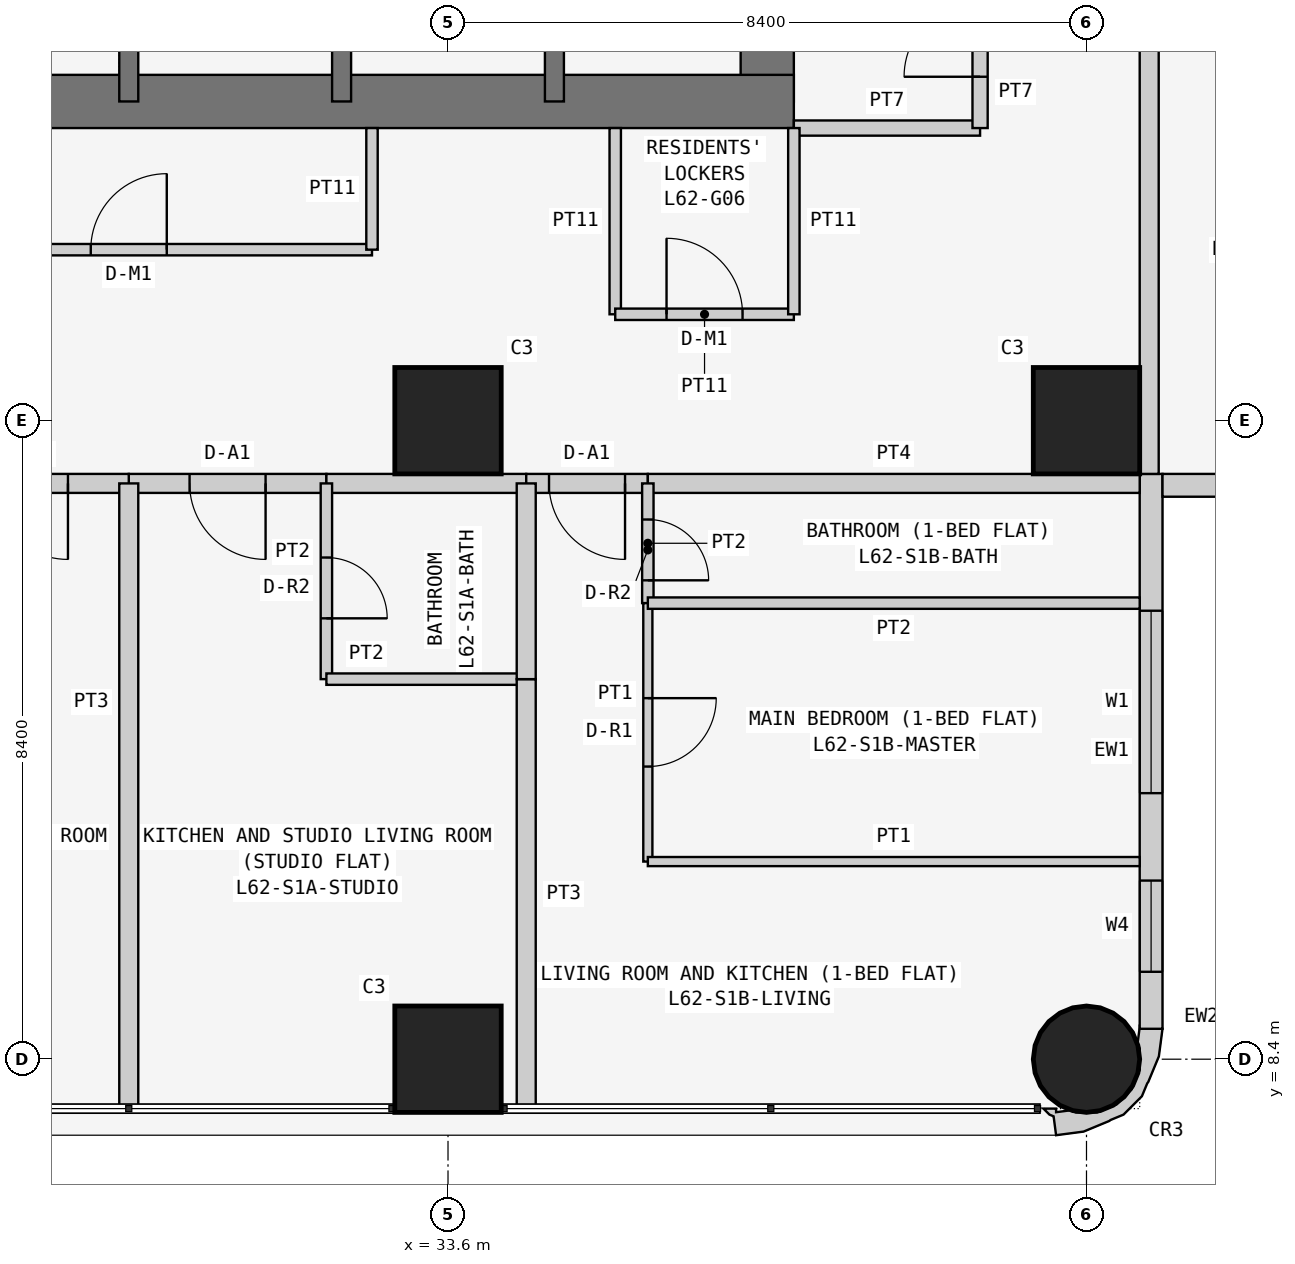
"""IFC4 building model, lengths in metres.
Left out: names, types, materials, properties, quantities, classifications, styles, units other than length and angle.
Written with IfcOpenShell. Run it as: python <this file> out.ifc"""

import sys

from ifc_helpers import new_model, si_unit, direction, frame, frame_2d, origin, origin_2d, place, context, subcontext, project, spatial, polyline, rectangle, circle, outline, extrude, element, fill, save


model = new_model("IFC4")
c1 = context("Model", 3, precision=1e-05, world=origin(), true_north=direction((0.0, 1.0)))
c2 = subcontext(c1, "Body", "Model", "MODEL_VIEW")
j1 = project(units=[si_unit("LENGTHUNIT", "METRE"), si_unit("PLANEANGLEUNIT", "RADIAN")], contexts=[c1])
p1 = place(None, origin())
s1 = spatial("IfcSite", under=j1, at=p1, CompositionType="ELEMENT")
p2 = place(p1, origin())
s2 = spatial("IfcBuilding", under=s1, at=p2, CompositionType="ELEMENT")
p3 = place(p2, frame((0.0, 0.0, 237.3)))
s3 = spatial("IfcBuildingStorey", under=s2, at=p3, CompositionType="ELEMENT", Elevation=237.3)
for number, where, z_axis, x_axis in (
    (1, (33.6, 8.4, 0.0), (0.0, 0.0, 1.0), (1.0, 0.0, 0.0)),
    (2, (33.6, 16.8, 0.0), (0.0, 0.0, 1.0), (1.0, 0.0, 0.0)),
):
    element("IfcColumn", number, at=place(p3, frame(where, z_axis=z_axis, x_axis=x_axis)), inside=s3, PredefinedType="COLUMN", context=c2, shape_type="SweptSolid", body=[
        extrude(rectangle(XDim=1.4, YDim=1.4, at=origin_2d()), origin(), (0.0, 0.0, 1.0), 3.6),
    ])
p4 = place(p3, frame((42.0, 8.4, 0.0), z_axis=(0.0, 0.0, 1.0), x_axis=(1.0, 0.0, 0.0)))
e3 = element("IfcColumn", 3, at=p4, inside=s3, PredefinedType="COLUMN", context=c2, shape_type="SweptSolid", body=[
    extrude(circle(Radius=0.7, at=origin_2d()), origin(), (0.0, 0.0, 1.0), 3.6),
])
p5 = place(p3, frame((42.0, 16.8, 0.0), z_axis=(0.0, 0.0, 1.0), x_axis=(1.0, 0.0, 0.0)))
e4 = element("IfcColumn", 4, at=p5, inside=s3, PredefinedType="COLUMN", context=c2, shape_type="SweptSolid", body=[
    extrude(rectangle(XDim=1.4, YDim=1.4, at=origin_2d()), origin(), (0.0, 0.0, 1.0), 3.6),
])
p6 = place(p3, frame((21.0, 21.0, 0.0), z_axis=(0.0, 0.0, 1.0), x_axis=(1.0, 0.0, 0.0)))
e5 = element("IfcWall", 5, at=p6, inside=s3, PredefinedType="SHEAR", context=c2, shape_type="SweptSolid", body=[
    extrude(rectangle(XDim=17.15, YDim=0.7, at=frame_2d((8.575, 0.0))), origin(), (0.0, 0.0, 1.0), 3.6),
])
p7 = place(p3, frame((37.8, 21.0, 0.0), z_axis=(0.0, 0.0, 1.0), x_axis=(0.0, 1.0, 0.0)))
e6 = element("IfcWall", 6, at=p7, inside=s3, PredefinedType="SHEAR", context=c2, shape_type="SweptSolid", body=[
    extrude(rectangle(XDim=17.15, YDim=0.7, at=frame_2d((8.575, 0.0))), origin(), (0.0, 0.0, 1.0), 3.6),
])
p8 = place(p7, frame((5.2, 0.0, 0.0)))
e7 = element("IfcOpeningElement", 7, at=p8, cuts=e6, PredefinedType="OPENING", context=c2, shape_type="SweptSolid", body=[
    extrude(rectangle(XDim=1.2, YDim=2.1, at=frame_2d((0.6, 1.05))), frame((0.0, 0.36, 0.0), z_axis=(0.0, -1.0, 0.0), x_axis=(1.0, 0.0, 0.0)), (0.0, 0.0, 1.0), 0.72),
])
for number, where, z_axis, x_axis in (
    (8, (29.4, 21.0, 0.0), (0.0, 0.0, 1.0), (0.0, 1.0, 0.0)),
    (9, (32.2, 21.0, 0.0), (0.0, 0.0, 1.0), (0.0, 1.0, 0.0)),
    (10, (35.0, 21.0, 0.0), (0.0, 0.0, 1.0), (0.0, 1.0, 0.0)),
):
    element("IfcWall", number, at=place(p3, frame(where, z_axis=z_axis, x_axis=x_axis)), inside=s3, PredefinedType="SHEAR", context=c2, shape_type="SweptSolid", body=[
        extrude(rectangle(XDim=3.2, YDim=0.25, at=frame_2d((1.6, 0.0))), origin(), (0.0, 0.0, 1.0), 3.6),
    ])
p9 = place(p3, frame((42.85, 8.8, 0.0), z_axis=(0.0, 0.0, 1.0), x_axis=(0.0, 1.0, 0.0)))
e11 = element("IfcWall", 11, at=p9, inside=s3, PredefinedType="SOLIDWALL", context=c2, shape_type="SweptSolid", body=[
    extrude(rectangle(XDim=7.3, YDim=0.3, at=frame_2d((3.65, 0.0))), origin(), (0.0, 0.0, 1.0), 3.45),
])
p10 = place(p9, frame((3.1, 0.0, 0.9)))
e12 = element("IfcOpeningElement", 12, at=p10, cuts=e11, PredefinedType="OPENING", context=c2, shape_type="SweptSolid", body=[
    extrude(rectangle(XDim=2.4, YDim=1.5, at=frame_2d((1.2, 0.75))), frame((0.0, 0.16, 0.0), z_axis=(0.0, -1.0, 0.0), x_axis=(1.0, 0.0, 0.0)), (0.0, 0.0, 1.0), 0.32),
])
p11 = place(p9, frame((0.75, 0.0, 0.9)))
e13 = element("IfcOpeningElement", 13, at=p11, cuts=e11, PredefinedType="OPENING", context=c2, shape_type="SweptSolid", body=[
    extrude(rectangle(XDim=1.2, YDim=1.5, at=frame_2d((0.6, 0.75))), frame((0.0, 0.16, 0.0), z_axis=(0.0, -1.0, 0.0), x_axis=(1.0, 0.0, 0.0)), (0.0, 0.0, 1.0), 0.32),
])
p12 = place(p3, frame((43.0, 15.95, 0.0), z_axis=(0.0, 0.0, 1.0), x_axis=(1.0, 0.0, 0.0)))
e14 = element("IfcWall", 14, at=p12, inside=s3, PredefinedType="SOLIDWALL", context=c2, shape_type="SweptSolid", body=[
    extrude(rectangle(XDim=7.0, YDim=0.3, at=frame_2d((3.5, 0.0))), origin(), (0.0, 0.0, 1.0), 3.45),
])
p13 = place(p12, frame((1.5, 0.0, 0.9)))
e15 = element("IfcOpeningElement", 15, at=p13, cuts=e14, PredefinedType="OPENING", context=c2, shape_type="SweptSolid", body=[
    extrude(rectangle(XDim=2.4, YDim=1.5, at=frame_2d((1.2, 0.75))), frame((0.0, 0.16, 0.0), z_axis=(0.0, -1.0, 0.0), x_axis=(1.0, 0.0, 0.0)), (0.0, 0.0, 1.0), 0.32),
])
p14 = place(p12, frame((5.05, 0.0, 0.9)))
e16 = element("IfcOpeningElement", 16, at=p14, cuts=e14, PredefinedType="OPENING", context=c2, shape_type="SweptSolid", body=[
    extrude(rectangle(XDim=1.2, YDim=1.5, at=frame_2d((0.6, 0.75))), frame((0.0, 0.16, 0.0), z_axis=(0.0, -1.0, 0.0), x_axis=(1.0, 0.0, 0.0)), (0.0, 0.0, 1.0), 0.32),
])
p15 = place(p3, frame((41.488, 7.812, 0.0), z_axis=(0.0, 0.0, 1.0), x_axis=(0.439933741929, -0.898030234854, 0.0)))
e17 = element("IfcWall", 17, at=p15, inside=s3, PredefinedType="SOLIDWALL", context=c2, shape_type="SweptSolid", body=[
    extrude(outline(polyline([(-0.222, 1.793), (-0.39, 1.541), (-0.372, 1.532), (-0.195, 1.414), (-0.12, 1.41), (0.131, 1.287), (0.315, 1.078), (0.406, 0.814), (0.388, 0.536), (0.265, 0.285), (0.209, 0.235), (0.148, 0.053), (0.105, 0.074), (0.032, -0.076), (0.138, -0.04), (0.182, -0.0), (0.419, -0.08), (0.536, 0.266), (0.559, 0.631), (0.555, 0.651), (0.566, 0.836), (0.455, 1.159), (0.333, 1.298), (0.324, 1.317), (0.082, 1.591), (-0.222, 1.793)])), origin(), (0.0, 0.0, 1.0), 3.45),
])
p16 = place(p3, frame((38.15, 20.65, 0.0), z_axis=(0.0, 0.0, 1.0), x_axis=(1.0, 0.0, 0.0)))
e18 = element("IfcWall", 18, at=p16, inside=s3, PredefinedType="PARTITIONING", context=c2, shape_type="SweptSolid", body=[
    extrude(rectangle(XDim=2.45, YDim=0.2, at=frame_2d((1.225, 0.0))), origin(), (0.0, 0.0, 1.0), 3.45),
])
p17 = place(p3, frame((40.6, 20.65, 0.0), z_axis=(0.0, 0.0, 1.0), x_axis=(0.0, 1.0, 0.0)))
e19 = element("IfcWall", 19, at=p17, inside=s3, PredefinedType="PARTITIONING", context=c2, shape_type="SweptSolid", body=[
    extrude(rectangle(XDim=2.35, YDim=0.2, at=frame_2d((1.175, 0.0))), origin(), (0.0, 0.0, 1.0), 3.45),
])
p18 = place(p17, frame((0.675, 0.0, 0.0)))
e20 = element("IfcOpeningElement", 20, at=p18, cuts=e19, PredefinedType="OPENING", context=c2, shape_type="SweptSolid", body=[
    extrude(rectangle(XDim=1.0, YDim=2.1, at=frame_2d((0.5, 1.05))), frame((0.0, 0.11, 0.0), z_axis=(0.0, -1.0, 0.0), x_axis=(1.0, 0.0, 0.0)), (0.0, 0.0, 1.0), 0.22),
])
p19 = place(p3, frame((20.65, 19.05, 0.0), z_axis=(0.0, 0.0, 1.0), x_axis=(1.0, 0.0, 0.0)))
e21 = element("IfcWall", 21, at=p19, inside=s3, PredefinedType="PARTITIONING", context=c2, shape_type="SweptSolid", body=[
    extrude(rectangle(XDim=11.95, YDim=0.15, at=frame_2d((5.975, 0.0))), origin(), (0.0, 0.0, 1.0), 3.45),
])
p20 = place(p19, frame((8.25, 0.0, 0.0)))
e22 = element("IfcOpeningElement", 22, at=p20, cuts=e21, PredefinedType="OPENING", context=c2, shape_type="SweptSolid", body=[
    extrude(rectangle(XDim=1.0, YDim=2.1, at=frame_2d((0.5, 1.05))), frame((0.0, 0.085, 0.0), z_axis=(0.0, -1.0, 0.0), x_axis=(1.0, 0.0, 0.0)), (0.0, 0.0, 1.0), 0.17),
])
p21 = place(p3, frame((32.6, 19.05, 0.0), z_axis=(0.0, 0.0, 1.0), x_axis=(0.0, 1.0, 0.0)))
e23 = element("IfcWall", 23, at=p21, inside=s3, PredefinedType="PARTITIONING", context=c2, shape_type="SweptSolid", body=[
    extrude(rectangle(XDim=1.6, YDim=0.15, at=frame_2d((0.8, 0.0))), origin(), (0.0, 0.0, 1.0), 3.45),
])
p22 = place(p3, frame((35.8, 20.65, 0.0), z_axis=(0.0, 0.0, 1.0), x_axis=(0.0, -1.0, 0.0)))
e24 = element("IfcWall", 24, at=p22, inside=s3, PredefinedType="PARTITIONING", context=c2, shape_type="SweptSolid", body=[
    extrude(rectangle(XDim=2.45, YDim=0.15, at=frame_2d((1.225, 0.0))), origin(), (0.0, 0.0, 1.0), 3.45),
])
p23 = place(p3, frame((35.8, 18.2, 0.0), z_axis=(0.0, 0.0, 1.0), x_axis=(1.0, 0.0, 0.0)))
e25 = element("IfcWall", 25, at=p23, inside=s3, PredefinedType="PARTITIONING", context=c2, shape_type="SweptSolid", body=[
    extrude(rectangle(XDim=2.35, YDim=0.15, at=frame_2d((1.175, 0.0))), origin(), (0.0, 0.0, 1.0), 3.45),
])
p24 = place(p23, frame((0.675, 0.0, 0.0)))
e26 = element("IfcOpeningElement", 26, at=p24, cuts=e25, PredefinedType="OPENING", context=c2, shape_type="SweptSolid", body=[
    extrude(rectangle(XDim=1.0, YDim=2.1, at=frame_2d((0.5, 1.05))), frame((0.0, 0.085, 0.0), z_axis=(0.0, -1.0, 0.0), x_axis=(1.0, 0.0, 0.0)), (0.0, 0.0, 1.0), 0.17),
])
p25 = place(p3, frame((38.15, 18.2, 0.0), z_axis=(0.0, 0.0, 1.0), x_axis=(0.0, 1.0, 0.0)))
e27 = element("IfcWall", 27, at=p25, inside=s3, PredefinedType="PARTITIONING", context=c2, shape_type="SweptSolid", body=[
    extrude(rectangle(XDim=2.45, YDim=0.15, at=frame_2d((1.225, 0.0))), origin(), (0.0, 0.0, 1.0), 3.45),
])
p26 = place(p3, frame((42.825, 22.971, 0.0), z_axis=(0.0, 0.0, 1.0), x_axis=(0.0, -1.0, 0.0)))
e28 = element("IfcWall", 28, at=p26, inside=s3, PredefinedType="PARTITIONING", context=c2, shape_type="SweptSolid", body=[
    extrude(rectangle(XDim=6.871, YDim=0.25, at=frame_2d((3.436, 0.0))), origin(), (0.0, 0.0, 1.0), 3.45),
])
p27 = place(p3, frame((32.0, 15.975, 0.0), z_axis=(0.0, 0.0, 1.0), x_axis=(-1.0, 0.0, 0.0)))
e29 = element("IfcWall", 29, at=p27, inside=s3, PredefinedType="PARTITIONING", context=c2, shape_type="SweptSolid", body=[
    extrude(rectangle(XDim=2.6, YDim=0.25, at=frame_2d((1.3, 0.0))), origin(), (0.0, 0.0, 1.0), 3.45),
])
p28 = place(p27, frame((0.8, 0.0, 0.0)))
e30 = element("IfcOpeningElement", 30, at=p28, cuts=e29, PredefinedType="OPENING", context=c2, shape_type="SweptSolid", body=[
    extrude(rectangle(XDim=1.0, YDim=2.1, at=frame_2d((0.5, 1.05))), frame((0.0, 0.135, 0.0), z_axis=(0.0, -1.0, 0.0), x_axis=(1.0, 0.0, 0.0)), (0.0, 0.0, 1.0), 0.27),
])
p29 = place(p3, frame((34.629, 15.975, 0.0), z_axis=(0.0, 0.0, 1.0), x_axis=(-1.0, 0.0, 0.0)))
e31 = element("IfcWall", 31, at=p29, inside=s3, PredefinedType="PARTITIONING", context=c2, shape_type="SweptSolid", body=[
    extrude(rectangle(XDim=2.629, YDim=0.25, at=frame_2d((1.314, 0.0))), origin(), (0.0, 0.0, 1.0), 3.45),
])
p30 = place(p3, frame((36.229, 15.975, 0.0), z_axis=(0.0, 0.0, 1.0), x_axis=(-1.0, 0.0, 0.0)))
e32 = element("IfcWall", 32, at=p30, inside=s3, PredefinedType="PARTITIONING", context=c2, shape_type="SweptSolid", body=[
    extrude(rectangle(XDim=1.6, YDim=0.25, at=frame_2d((0.8, 0.0))), origin(), (0.0, 0.0, 1.0), 3.45),
])
p31 = place(p30, frame((0.3, 0.0, 0.0)))
e33 = element("IfcOpeningElement", 33, at=p31, cuts=e32, PredefinedType="OPENING", context=c2, shape_type="SweptSolid", body=[
    extrude(rectangle(XDim=1.0, YDim=2.1, at=frame_2d((0.5, 1.05))), frame((0.0, 0.135, 0.0), z_axis=(0.0, -1.0, 0.0), x_axis=(1.0, 0.0, 0.0)), (0.0, 0.0, 1.0), 0.27),
])
p32 = place(p3, frame((42.7, 15.975, 0.0), z_axis=(0.0, 0.0, 1.0), x_axis=(-1.0, 0.0, 0.0)))
e34 = element("IfcWall", 34, at=p32, inside=s3, PredefinedType="PARTITIONING", context=c2, shape_type="SweptSolid", body=[
    extrude(rectangle(XDim=6.471, YDim=0.25, at=frame_2d((3.235, 0.0))), origin(), (0.0, 0.0, 1.0), 3.45),
])
p33 = place(p3, frame((29.4, 15.975, 0.0), z_axis=(0.0, 0.0, 1.0), x_axis=(-1.0, 0.0, 0.0)))
e35 = element("IfcWall", 35, at=p33, inside=s3, PredefinedType="PARTITIONING", context=c2, shape_type="SweptSolid", body=[
    extrude(rectangle(XDim=2.6, YDim=0.25, at=frame_2d((1.3, 0.0))), origin(), (0.0, 0.0, 1.0), 3.45),
])
p34 = place(p33, frame((0.8, 0.0, 0.0)))
e36 = element("IfcOpeningElement", 36, at=p34, cuts=e35, PredefinedType="OPENING", context=c2, shape_type="SweptSolid", body=[
    extrude(rectangle(XDim=1.0, YDim=2.1, at=frame_2d((0.5, 1.05))), frame((0.0, 0.135, 0.0), z_axis=(0.0, -1.0, 0.0), x_axis=(1.0, 0.0, 0.0)), (0.0, 0.0, 1.0), 0.27),
])
p35 = place(p3, frame((32.0, 15.975, 0.0), z_axis=(0.0, 0.0, 1.0), x_axis=(0.0, -1.0, 0.0)))
e37 = element("IfcWall", 37, at=p35, inside=s3, PredefinedType="PARTITIONING", context=c2, shape_type="SweptSolid", body=[
    extrude(rectangle(XDim=2.575, YDim=0.15, at=frame_2d((1.288, 0.0))), origin(), (0.0, 0.0, 1.0), 3.45),
])
p36 = place(p35, frame((0.975, 0.0, 0.0)))
e38 = element("IfcOpeningElement", 38, at=p36, cuts=e37, PredefinedType="OPENING", context=c2, shape_type="SweptSolid", body=[
    extrude(rectangle(XDim=0.8, YDim=2.1, at=frame_2d((0.4, 1.05))), frame((0.0, 0.085, 0.0), z_axis=(0.0, -1.0, 0.0), x_axis=(1.0, 0.0, 0.0)), (0.0, 0.0, 1.0), 0.17),
])
p37 = place(p3, frame((32.0, 13.4, 0.0), z_axis=(0.0, 0.0, 1.0), x_axis=(1.0, 0.0, 0.0)))
e39 = element("IfcWall", 39, at=p37, inside=s3, PredefinedType="PARTITIONING", context=c2, shape_type="SweptSolid", body=[
    extrude(rectangle(XDim=2.629, YDim=0.15, at=frame_2d((1.314, 0.0))), origin(), (0.0, 0.0, 1.0), 3.45),
])
p38 = place(p3, frame((34.629, 13.4, 0.0), z_axis=(0.0, 0.0, 1.0), x_axis=(0.0, -1.0, 0.0)))
e40 = element("IfcWall", 40, at=p38, inside=s3, PredefinedType="PARTITIONING", context=c2, shape_type="SweptSolid", body=[
    extrude(rectangle(XDim=5.65, YDim=0.25, at=frame_2d((2.825, 0.0))), origin(), (0.0, 0.0, 1.0), 3.45),
])
p39 = place(p3, frame((29.4, 7.75, 0.0), z_axis=(0.0, 0.0, 1.0), x_axis=(0.0, 1.0, 0.0)))
e41 = element("IfcWall", 41, at=p39, inside=s3, PredefinedType="PARTITIONING", context=c2, shape_type="SweptSolid", body=[
    extrude(rectangle(XDim=8.225, YDim=0.25, at=frame_2d((4.113, 0.0))), origin(), (0.0, 0.0, 1.0), 2.848),
])
p40 = place(p3, frame((34.629, 13.4, 0.0), z_axis=(0.0, 0.0, 1.0), x_axis=(0.0, 1.0, 0.0)))
e42 = element("IfcWall", 42, at=p40, inside=s3, PredefinedType="PARTITIONING", context=c2, shape_type="SweptSolid", body=[
    extrude(rectangle(XDim=2.575, YDim=0.25, at=frame_2d((1.288, 0.0))), origin(), (0.0, 0.0, 1.0), 3.45),
])
p41 = place(p3, frame((36.229, 15.975, 0.0), z_axis=(0.0, 0.0, 1.0), x_axis=(0.0, -1.0, 0.0)))
e43 = element("IfcWall", 43, at=p41, inside=s3, PredefinedType="PARTITIONING", context=c2, shape_type="SweptSolid", body=[
    extrude(rectangle(XDim=1.575, YDim=0.15, at=frame_2d((0.788, 0.0))), origin(), (0.0, 0.0, 1.0), 3.45),
])
p42 = place(p41, frame((0.475, 0.0, 0.0)))
e44 = element("IfcOpeningElement", 44, at=p42, cuts=e43, PredefinedType="OPENING", context=c2, shape_type="SweptSolid", body=[
    extrude(rectangle(XDim=0.8, YDim=2.1, at=frame_2d((0.4, 1.05))), frame((0.0, 0.085, 0.0), z_axis=(0.0, -1.0, 0.0), x_axis=(1.0, 0.0, 0.0)), (0.0, 0.0, 1.0), 0.17),
])
p43 = place(p3, frame((36.229, 14.4, 0.0), z_axis=(0.0, 0.0, 1.0), x_axis=(0.0, -1.0, 0.0)))
e45 = element("IfcWall", 45, at=p43, inside=s3, PredefinedType="PARTITIONING", context=c2, shape_type="SweptSolid", body=[
    extrude(rectangle(XDim=3.4, YDim=0.12, at=frame_2d((1.7, 0.0))), origin(), (0.0, 0.0, 1.0), 3.45),
])
p44 = place(p43, frame((1.25, 0.0, 0.0)))
e46 = element("IfcOpeningElement", 46, at=p44, cuts=e45, PredefinedType="OPENING", context=c2, shape_type="SweptSolid", body=[
    extrude(rectangle(XDim=0.9, YDim=2.1, at=frame_2d((0.45, 1.05))), frame((0.0, 0.07, 0.0), z_axis=(0.0, -1.0, 0.0), x_axis=(1.0, 0.0, 0.0)), (0.0, 0.0, 1.0), 0.14),
])
p45 = place(p3, frame((36.229, 11.0, 0.0), z_axis=(0.0, 0.0, 1.0), x_axis=(1.0, 0.0, 0.0)))
e47 = element("IfcWall", 47, at=p45, inside=s3, PredefinedType="PARTITIONING", context=c2, shape_type="SweptSolid", body=[
    extrude(rectangle(XDim=6.471, YDim=0.12, at=frame_2d((3.235, 0.0))), origin(), (0.0, 0.0, 1.0), 3.45),
])
p46 = place(p3, frame((36.229, 14.4, 0.0), z_axis=(0.0, 0.0, 1.0), x_axis=(1.0, 0.0, 0.0)))
e48 = element("IfcWall", 48, at=p46, inside=s3, PredefinedType="PARTITIONING", context=c2, shape_type="SweptSolid", body=[
    extrude(rectangle(XDim=6.471, YDim=0.15, at=frame_2d((3.235, 0.0))), origin(), (0.0, 0.0, 1.0), 3.45),
])
p47 = place(p10, origin())
e49 = element("IfcWindow", 49, at=p47, inside=s3, PartitioningType="SINGLE_PANEL", PredefinedType="WINDOW", context=c2, shape_type="SweptSolid", body=[
    extrude(rectangle(XDim=2.4, YDim=1.5, at=frame_2d((1.2, 0.75))), frame((0.0, 0.03, 0.0), z_axis=(0.0, -1.0, 0.0), x_axis=(1.0, 0.0, 0.0)), (0.0, 0.0, 1.0), 0.06),
])
fill(e12, e49)
p48 = place(p11, origin())
e50 = element("IfcWindow", 50, at=p48, inside=s3, PartitioningType="SINGLE_PANEL", PredefinedType="WINDOW", context=c2, shape_type="SweptSolid", body=[
    extrude(rectangle(XDim=1.2, YDim=1.5, at=frame_2d((0.6, 0.75))), frame((0.0, 0.03, 0.0), z_axis=(0.0, -1.0, 0.0), x_axis=(1.0, 0.0, 0.0)), (0.0, 0.0, 1.0), 0.06),
])
fill(e13, e50)
p49 = place(p18, origin())
e51 = element("IfcDoor", 51, at=p49, inside=s3, OperationType="SINGLE_SWING_LEFT", PredefinedType="DOOR", context=c2, shape_type="SweptSolid", body=[
    extrude(rectangle(XDim=1.0, YDim=2.1, at=frame_2d((0.5, 1.05))), frame((0.0, 0.025, 0.0), z_axis=(0.0, -1.0, 0.0), x_axis=(1.0, 0.0, 0.0)), (0.0, 0.0, 1.0), 0.05),
])
fill(e20, e51)
p50 = place(p20, origin())
e52 = element("IfcDoor", 52, at=p50, inside=s3, OperationType="SINGLE_SWING_RIGHT", PredefinedType="DOOR", context=c2, shape_type="SweptSolid", body=[
    extrude(rectangle(XDim=1.0, YDim=2.1, at=frame_2d((0.5, 1.05))), frame((0.0, 0.025, 0.0), z_axis=(0.0, -1.0, 0.0), x_axis=(1.0, 0.0, 0.0)), (0.0, 0.0, 1.0), 0.05),
])
fill(e22, e52)
p51 = place(p24, origin())
e53 = element("IfcDoor", 53, at=p51, inside=s3, OperationType="SINGLE_SWING_LEFT", PredefinedType="DOOR", context=c2, shape_type="SweptSolid", body=[
    extrude(rectangle(XDim=1.0, YDim=2.1, at=frame_2d((0.5, 1.05))), frame((0.0, 0.025, 0.0), z_axis=(0.0, -1.0, 0.0), x_axis=(1.0, 0.0, 0.0)), (0.0, 0.0, 1.0), 0.05),
])
fill(e26, e53)
p52 = place(p28, origin())
e54 = element("IfcDoor", 54, at=p52, inside=s3, OperationType="SINGLE_SWING_LEFT", PredefinedType="DOOR", context=c2, shape_type="SweptSolid", body=[
    extrude(rectangle(XDim=1.0, YDim=2.1, at=frame_2d((0.5, 1.05))), frame((0.0, 0.025, 0.0), z_axis=(0.0, -1.0, 0.0), x_axis=(1.0, 0.0, 0.0)), (0.0, 0.0, 1.0), 0.05),
])
fill(e30, e54)
p53 = place(p36, origin())
e55 = element("IfcDoor", 55, at=p53, inside=s3, OperationType="SINGLE_SWING_RIGHT", PredefinedType="DOOR", context=c2, shape_type="SweptSolid", body=[
    extrude(rectangle(XDim=0.8, YDim=2.1, at=frame_2d((0.4, 1.05))), frame((0.0, 0.025, 0.0), z_axis=(0.0, -1.0, 0.0), x_axis=(1.0, 0.0, 0.0)), (0.0, 0.0, 1.0), 0.05),
])
fill(e38, e55)
p54 = place(p31, origin())
e56 = element("IfcDoor", 56, at=p54, inside=s3, OperationType="SINGLE_SWING_LEFT", PredefinedType="DOOR", context=c2, shape_type="SweptSolid", body=[
    extrude(rectangle(XDim=1.0, YDim=2.1, at=frame_2d((0.5, 1.05))), frame((0.0, 0.025, 0.0), z_axis=(0.0, -1.0, 0.0), x_axis=(1.0, 0.0, 0.0)), (0.0, 0.0, 1.0), 0.05),
])
fill(e33, e56)
p55 = place(p42, origin())
e57 = element("IfcDoor", 57, at=p55, inside=s3, OperationType="SINGLE_SWING_RIGHT", PredefinedType="DOOR", context=c2, shape_type="SweptSolid", body=[
    extrude(rectangle(XDim=0.8, YDim=2.1, at=frame_2d((0.4, 1.05))), frame((0.0, 0.025, 0.0), z_axis=(0.0, -1.0, 0.0), x_axis=(1.0, 0.0, 0.0)), (0.0, 0.0, 1.0), 0.05),
])
fill(e44, e57)
p56 = place(p44, origin())
e58 = element("IfcDoor", 58, at=p56, inside=s3, OperationType="SINGLE_SWING_LEFT", PredefinedType="DOOR", context=c2, shape_type="SweptSolid", body=[
    extrude(rectangle(XDim=0.9, YDim=2.1, at=frame_2d((0.45, 1.05))), frame((0.0, 0.025, 0.0), z_axis=(0.0, -1.0, 0.0), x_axis=(1.0, 0.0, 0.0)), (0.0, 0.0, 1.0), 0.05),
])
fill(e46, e58)
p57 = place(p34, origin())
e59 = element("IfcDoor", 59, at=p57, inside=s3, OperationType="SINGLE_SWING_LEFT", PredefinedType="DOOR", context=c2, shape_type="SweptSolid", body=[
    extrude(rectangle(XDim=1.0, YDim=2.1, at=frame_2d((0.5, 1.05))), frame((0.0, 0.025, 0.0), z_axis=(0.0, -1.0, 0.0), x_axis=(1.0, 0.0, 0.0)), (0.0, 0.0, 1.0), 0.05),
])
fill(e36, e59)
save(model, sys.argv[1])
